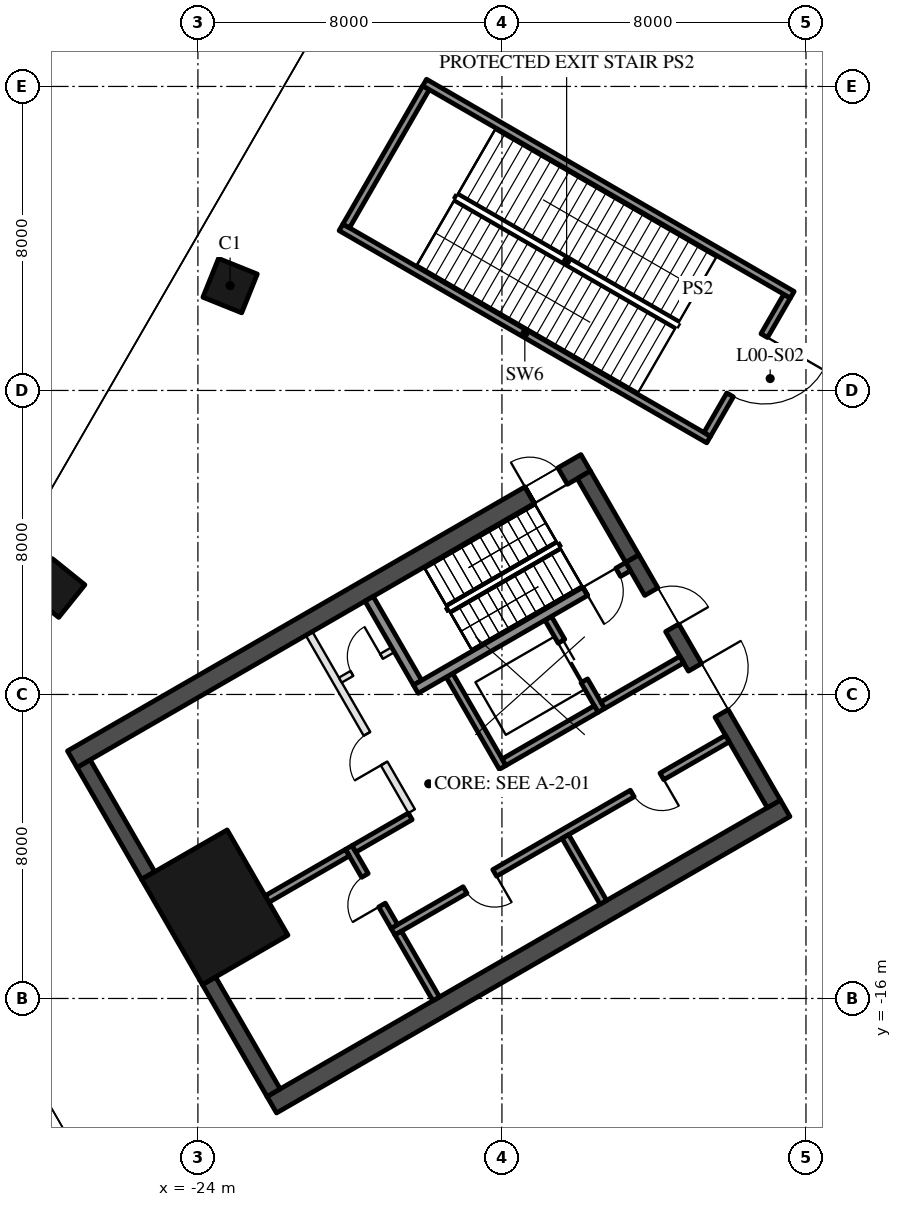
"""IFC4 building model, lengths in metres.
Left out: names, types, materials, properties, quantities, classifications, styles, units other than length and angle.
Written with IfcOpenShell. Run it as: python <this file> out.ifc"""

import sys

from ifc_helpers import new_model, si_unit, direction, frame, frame_2d, origin, origin_2d, place, context, subcontext, project, spatial, rectangle, hollow_rectangle, extrude, boolean, halfspace, element, fill, save


model = new_model("IFC4")
c1 = context("Model", 3, precision=1e-05, world=origin(), true_north=direction((0.0, 1.0)))
c2 = subcontext(c1, "Body", "Model", "MODEL_VIEW")
j1 = project(units=[si_unit("LENGTHUNIT", "METRE"), si_unit("PLANEANGLEUNIT", "RADIAN")], contexts=[c1])
p1 = place(None, origin())
s1 = spatial("IfcSite", under=j1, at=p1, CompositionType="ELEMENT")
p2 = place(p1, origin())
s2 = spatial("IfcBuilding", under=s1, at=p2, CompositionType="ELEMENT")
p3 = place(p2, origin())
s3 = spatial("IfcBuildingStorey", under=s2, at=p3, CompositionType="ELEMENT", Elevation=0.0)
p4 = place(p3, frame((-23.153, 2.758, 0.0), z_axis=(0.158231651294, -0.022440027718, 0.987146994973), x_axis=(-0.495168958636, -0.866745273107, 0.059668534009)))
e1 = element("IfcColumn", 1, at=p4, inside=s3, PredefinedType="COLUMN", context=c2, shape_type="SweptSolid", body=[
    boolean("DIFFERENCE", extrude(hollow_rectangle(XDim=1.1, YDim=1.1, WallThickness=0.05, at=origin_2d()), origin(), (0.0, 0.0, 1.0), 9.117), halfspace(frame((0.0, 0.0, 9.101), z_axis=(0.0, 0.0, 1.0), x_axis=(1.0, 0.0, 0.0)), False)),
])
p5 = place(p3, frame((-27.747, -5.199, 0.0), z_axis=(0.187040427199, 0.029060254354, 0.981922288274), x_axis=(-0.488808494451, -0.86427960463, 0.118688755878)))
e2 = element("IfcColumn", 2, at=p5, inside=s3, PredefinedType="COLUMN", context=c2, shape_type="SweptSolid", body=[
    boolean("DIFFERENCE", extrude(hollow_rectangle(XDim=1.1, YDim=1.1, WallThickness=0.05, at=origin_2d()), origin(), (0.0, 0.0, 1.0), 9.166), halfspace(frame((0.0, 0.0, 9.146), z_axis=(0.0, 0.0, 1.0), x_axis=(1.0, 0.0, 0.0)), False)),
])
p6 = place(p3, frame((-23.556, -13.6, 0.0), z_axis=(0.0, 0.0, 1.0), x_axis=(-0.5, 0.866025403784, 0.0)))
e3 = element("IfcColumn", 3, at=p6, inside=s3, PredefinedType="COLUMN", context=c2, shape_type="SweptSolid", body=[
    extrude(hollow_rectangle(XDim=3.2, YDim=2.6, WallThickness=0.08, at=origin_2d()), origin(), (0.0, 0.0, 1.0), 9.0),
])
p7 = place(p3, frame((-8.547, -10.997, 0.0), z_axis=(0.0, 0.0, 1.0), x_axis=(-0.866024264262, -0.500001973705, 0.0)))
e4 = element("IfcWall", 4, at=p7, inside=s3, PredefinedType="SHEAR", context=c2, shape_type="SweptSolid", body=[
    extrude(rectangle(XDim=15.6, YDim=0.5, at=frame_2d((7.8, 0.0))), origin(), (0.0, 0.0, 1.0), 8.7),
])
p8 = place(p3, frame((-23.708, -15.536, 0.0), z_axis=(0.0, 0.0, 1.0), x_axis=(0.500008388397, -0.866020560687, 0.0)))
e5 = element("IfcWall", 5, at=p8, inside=s3, PredefinedType="SHEAR", context=c2, shape_type="SweptSolid", body=[
    extrude(rectangle(XDim=3.4, YDim=0.4, at=frame_2d((1.7, 0.0))), origin(), (0.0, 0.0, 1.0), 8.7),
])
p9 = place(p3, frame((-27.009, -9.82, 0.0), z_axis=(0.0, 0.0, 1.0), x_axis=(0.499977295307, -0.866038511948, 0.0)))
e6 = element("IfcWall", 6, at=p9, inside=s3, PredefinedType="SHEAR", context=c2, shape_type="SweptSolid", body=[
    extrude(rectangle(XDim=3.4, YDim=0.4, at=frame_2d((1.7, 0.0))), origin(), (0.0, 0.0, 1.0), 8.7),
])
p10 = place(p3, frame((-19.496, -5.482, 0.0), z_axis=(0.0, 0.0, 1.0), x_axis=(0.499990435942, -0.866030925526, 0.0)))
e7 = element("IfcWall", 7, at=p10, inside=s3, PredefinedType="SHEAR", context=c2, shape_type="SweptSolid", body=[
    extrude(rectangle(XDim=2.55, YDim=0.25, at=frame_2d((1.275, 0.0))), origin(), (0.0, 0.0, 1.0), 8.7),
])
p11 = place(p3, frame((-17.381, -7.495, 0.0), z_axis=(0.0, 0.0, 1.0), x_axis=(0.500011755427, -0.866018616679, 0.0)))
e8 = element("IfcWall", 8, at=p11, inside=s3, PredefinedType="SHEAR", context=c2, shape_type="SweptSolid", body=[
    extrude(rectangle(XDim=2.8, YDim=0.2, at=frame_2d((1.4, 0.0))), origin(), (0.0, 0.0, 1.0), 8.7),
])
p12 = place(p3, frame((-14.783, -5.995, 0.0), z_axis=(0.0, 0.0, 1.0), x_axis=(0.49994636267, -0.866056369097, 0.0)))
e9 = element("IfcWall", 9, at=p12, inside=s3, PredefinedType="SHEAR", context=c2, shape_type="SweptSolid", body=[
    extrude(rectangle(XDim=2.8, YDim=0.2, at=frame_2d((1.4, 0.0))), origin(), (0.0, 0.0, 1.0), 8.7),
])
p13 = place(p12, frame((0.7, 0.0, 0.0)))
e10 = element("IfcOpeningElement", 10, at=p13, cuts=e9, PredefinedType="OPENING", context=c2, shape_type="SweptSolid", body=[
    extrude(rectangle(XDim=1.2, YDim=2.1, at=frame_2d((0.6, 1.05))), frame((0.0, 0.11, 0.0), z_axis=(0.0, -1.0, 0.0), x_axis=(1.0, 0.0, 0.0)), (0.0, 0.0, 1.0), 0.22),
])
p14 = place(p3, frame((-13.52, -8.383, 0.0), z_axis=(0.0, 0.0, 1.0), x_axis=(-0.866034573852, -0.49998411664, 0.0)))
e11 = element("IfcWall", 11, at=p14, inside=s3, PredefinedType="SHEAR", context=c2, shape_type="SweptSolid", body=[
    extrude(rectangle(XDim=2.8, YDim=0.2, at=frame_2d((1.4, 0.0))), origin(), (0.0, 0.0, 1.0), 8.7),
])
p15 = place(p3, frame((-11.268, -7.083, 0.0), z_axis=(0.0, 0.0, 1.0), x_axis=(-0.866050077142, -0.499957262057, 0.0)))
e12 = element("IfcWall", 12, at=p15, inside=s3, PredefinedType="SHEAR", context=c2, shape_type="SweptSolid", body=[
    extrude(rectangle(XDim=2.4, YDim=0.2, at=frame_2d((1.2, 0.0))), origin(), (0.0, 0.0, 1.0), 8.7),
])
p16 = place(p3, frame((-10.068, -9.162, 0.0), z_axis=(0.0, 0.0, 1.0), x_axis=(-0.866032725843, -0.499987317609, 0.0)))
e13 = element("IfcWall", 13, at=p16, inside=s3, PredefinedType="SHEAR", context=c2, shape_type="SweptSolid", body=[
    extrude(rectangle(XDim=10.16, YDim=0.2, at=frame_2d((5.08, 0.0))), origin(), (0.0, 0.0, 1.0), 8.7),
])
p17 = place(p16, frame((1.99, 0.0, 0.0)))
e14 = element("IfcOpeningElement", 14, at=p17, cuts=e13, PredefinedType="OPENING", context=c2, shape_type="SweptSolid", body=[
    extrude(rectangle(XDim=0.9, YDim=2.1, at=frame_2d((0.45, 1.05))), frame((0.0, 0.11, 0.0), z_axis=(0.0, -1.0, 0.0), x_axis=(1.0, 0.0, 0.0)), (0.0, 0.0, 1.0), 0.22),
])
p18 = place(p16, frame((7.07, 0.0, 0.0)))
e15 = element("IfcOpeningElement", 15, at=p18, cuts=e13, PredefinedType="OPENING", context=c2, shape_type="SweptSolid", body=[
    extrude(rectangle(XDim=0.9, YDim=2.1, at=frame_2d((0.45, 1.05))), frame((0.0, 0.11, 0.0), z_axis=(0.0, -1.0, 0.0), x_axis=(1.0, 0.0, 0.0)), (0.0, 0.0, 1.0), 0.22),
])
p19 = place(p3, frame((-20.031, -12.026, 0.0), z_axis=(0.0, 0.0, 1.0), x_axis=(0.500033551112, -0.866006032174, 0.0)))
e16 = element("IfcWall", 16, at=p19, inside=s3, PredefinedType="SHEAR", context=c2, shape_type="SweptSolid", body=[
    extrude(rectangle(XDim=2.4, YDim=0.2, at=frame_2d((1.2, 0.0))), origin(), (0.0, 0.0, 1.0), 8.7),
])
p20 = place(p19, frame((0.85, 0.0, 0.0)))
e17 = element("IfcOpeningElement", 17, at=p20, cuts=e16, PredefinedType="OPENING", context=c2, shape_type="SweptSolid", body=[
    extrude(rectangle(XDim=0.9, YDim=2.1, at=frame_2d((0.45, 1.05))), frame((0.0, 0.11, 0.0), z_axis=(0.0, -1.0, 0.0), x_axis=(1.0, 0.0, 0.0)), (0.0, 0.0, 1.0), 0.22),
])
p21 = place(p3, frame((-18.413, -11.208, 0.0), z_axis=(0.0, 0.0, 1.0), x_axis=(-0.866038183914, -0.499977863513, 0.0)))
e18 = element("IfcWall", 18, at=p21, inside=s3, PredefinedType="SHEAR", context=c2, shape_type="SweptSolid", body=[
    extrude(rectangle(XDim=1.71, YDim=0.2, at=frame_2d((0.855, 0.0))), origin(), (0.0, 0.0, 1.0), 8.7),
])
for number, where, z_axis, x_axis in (
    (19, (-14.331, -11.738, 0.0), (0.0, 0.0, 1.0), (0.5, -0.866, 0.0)),
    (20, (-18.73, -14.278, 0.0), (0.0, 0.0, 1.0), (0.5, -0.866, 0.0)),
):
    element("IfcWall", number, at=place(p3, frame(where, z_axis=z_axis, x_axis=x_axis)), inside=s3, PredefinedType="SHEAR", context=c2, shape_type="SweptSolid", body=[
        extrude(rectangle(XDim=2.0, YDim=0.2, at=frame_2d((1.0, 0.0))), origin(), (0.0, 0.0, 1.0), 8.7),
    ])
p22 = place(p3, frame((-20.067, -12.163, 0.0), z_axis=(0.0, 0.0, 1.0), x_axis=(-0.866048967903, -0.499959183527, 0.0)))
e21 = element("IfcWall", 21, at=p22, inside=s3, PredefinedType="SHEAR", context=c2, shape_type="SweptSolid", body=[
    extrude(rectangle(XDim=2.44, YDim=0.2, at=frame_2d((1.22, 0.0))), origin(), (0.0, 0.0, 1.0), 8.7),
])
p23 = place(p3, frame((-21.076, -6.395, 0.0), z_axis=(0.0, 0.0, 1.0), x_axis=(0.50001468107, -0.866016927499, 0.0)))
e22 = element("IfcWall", 22, at=p23, inside=s3, PredefinedType="PARTITIONING", context=c2, shape_type="SweptSolid", body=[
    extrude(rectangle(XDim=5.4, YDim=0.2, at=frame_2d((2.7, 0.0))), origin(), (0.0, 0.0, 1.0), 8.7),
])
p24 = place(p23, frame((3.05, 0.0, 0.0)))
e23 = element("IfcOpeningElement", 23, at=p24, cuts=e22, PredefinedType="OPENING", context=c2, shape_type="SweptSolid", body=[
    extrude(rectangle(XDim=0.9, YDim=2.1, at=frame_2d((0.45, 1.05))), frame((0.0, 0.11, 0.0), z_axis=(0.0, -1.0, 0.0), x_axis=(1.0, 0.0, 0.0)), (0.0, 0.0, 1.0), 0.22),
])
p25 = place(p3, frame((-18.866, -6.822, 0.0), z_axis=(0.0, 0.0, 1.0), x_axis=(-0.866028054938, -0.499995408039, 0.0)))
e24 = element("IfcWall", 24, at=p25, inside=s3, PredefinedType="PARTITIONING", context=c2, shape_type="SweptSolid", body=[
    extrude(rectangle(XDim=1.6, YDim=0.15, at=frame_2d((0.8, 0.0))), origin(), (0.0, 0.0, 1.0), 8.7),
])
p26 = place(p25, frame((0.35, 0.0, 0.0)))
e25 = element("IfcOpeningElement", 25, at=p26, cuts=e24, PredefinedType="OPENING", context=c2, shape_type="SweptSolid", body=[
    extrude(rectangle(XDim=0.9, YDim=2.1, at=frame_2d((0.45, 1.05))), frame((0.0, 0.085, 0.0), z_axis=(0.0, -1.0, 0.0), x_axis=(1.0, 0.0, 0.0)), (0.0, 0.0, 1.0), 0.17),
])
p27 = place(p3, frame((-13.797, -1.903, 0.0), z_axis=(0.0, 0.0, 1.0), x_axis=(-0.866033076574, -0.499986710104, 0.0)))
e26 = element("IfcWall", 26, at=p27, inside=s3, PredefinedType="SHEAR", context=c2, shape_type="SweptSolid", body=[
    extrude(rectangle(XDim=1.706, YDim=0.5, at=frame_2d((0.853, 0.0))), origin(), (0.0, 0.0, 1.0), 8.7),
])
p28 = place(p27, frame((0.7, 0.0, 0.0)))
e27 = element("IfcOpeningElement", 27, at=p28, cuts=e26, PredefinedType="OPENING", context=c2, shape_type="SweptSolid", body=[
    extrude(rectangle(XDim=1.0, YDim=2.1, at=frame_2d((0.5, 1.05))), frame((0.0, 0.26, 0.0), z_axis=(0.0, -1.0, 0.0), x_axis=(1.0, 0.0, 0.0)), (0.0, 0.0, 1.0), 0.52),
])
p29 = place(p3, frame((-15.274, -2.756, 0.0), z_axis=(0.0, 0.0, 1.0), x_axis=(-0.86602318214, -0.500003847982, 0.0)))
e28 = element("IfcWall", 28, at=p29, inside=s3, PredefinedType="SHEAR", context=c2, shape_type="SweptSolid", body=[
    extrude(rectangle(XDim=13.894, YDim=0.5, at=frame_2d((6.947, 0.0))), origin(), (0.0, 0.0, 1.0), 8.7),
])
p30 = place(p3, frame((-13.845, -2.22, 0.0), z_axis=(0.0, 0.0, 1.0), x_axis=(0.500062241894, -0.865989465428, 0.0)))
e29 = element("IfcWall", 29, at=p30, inside=s3, PredefinedType="SHEAR", context=c2, shape_type="SweptSolid", body=[
    extrude(rectangle(XDim=2.55, YDim=0.4, at=frame_2d((1.275, 0.0))), origin(), (0.0, 0.0, 1.0), 8.7),
])
p31 = place(p3, frame((-12.57, -4.428, 0.0), z_axis=(0.0, 0.0, 1.0), x_axis=(0.499984378957, -0.86603442241, 0.0)))
e30 = element("IfcWall", 30, at=p31, inside=s3, PredefinedType="SHEAR", context=c2, shape_type="SweptSolid", body=[
    extrude(rectangle(XDim=7.45, YDim=0.4, at=frame_2d((3.725, 0.0))), origin(), (0.0, 0.0, 1.0), 8.7),
])
p32 = place(p31, frame((1.0, 0.0, 0.0)))
e31 = element("IfcOpeningElement", 31, at=p32, cuts=e30, PredefinedType="OPENING", context=c2, shape_type="SweptSolid", body=[
    extrude(rectangle(XDim=1.1, YDim=2.1, at=frame_2d((0.55, 1.05))), frame((0.0, 0.21, 0.0), z_axis=(0.0, -1.0, 0.0), x_axis=(1.0, 0.0, 0.0)), (0.0, 0.0, 1.0), 0.42),
])
p33 = place(p31, frame((3.3, 0.0, 0.0)))
e32 = element("IfcOpeningElement", 32, at=p33, cuts=e30, PredefinedType="OPENING", context=c2, shape_type="SweptSolid", body=[
    extrude(rectangle(XDim=1.4, YDim=2.1, at=frame_2d((0.7, 1.05))), frame((0.0, 0.21, 0.0), z_axis=(0.0, -1.0, 0.0), x_axis=(1.0, 0.0, 0.0)), (0.0, 0.0, 1.0), 0.42),
])
p34 = place(p3, frame((-12.681, -4.636, 0.0), z_axis=(0.0, 0.0, 1.0), x_axis=(-0.86601437931, -0.500019094464, 0.0)))
e33 = element("IfcWall", 33, at=p34, inside=s3, PredefinedType="SHEAR", context=c2, shape_type="SweptSolid", body=[
    extrude(rectangle(XDim=1.306, YDim=0.25, at=frame_2d((0.653, 0.0))), origin(), (0.0, 0.0, 1.0), 8.7),
])
p35 = place(p34, frame((0.3, 0.0, 0.0)))
e34 = element("IfcOpeningElement", 34, at=p35, cuts=e33, PredefinedType="OPENING", context=c2, shape_type="SweptSolid", body=[
    extrude(rectangle(XDim=1.0, YDim=2.1, at=frame_2d((0.5, 1.05))), frame((0.0, 0.135, 0.0), z_axis=(0.0, -1.0, 0.0), x_axis=(1.0, 0.0, 0.0)), (0.0, 0.0, 1.0), 0.27),
])
p36 = place(p3, frame((-13.812, -5.29, 0.0), z_axis=(0.0, 0.0, 1.0), x_axis=(-0.866023561601, -0.500003190742, 0.0)))
e35 = element("IfcWall", 35, at=p36, inside=s3, PredefinedType="SHEAR", context=c2, shape_type="SweptSolid", body=[
    extrude(rectangle(XDim=5.144, YDim=0.25, at=frame_2d((2.572, 0.0))), origin(), (0.0, 0.0, 1.0), 8.7),
])
p37 = place(p3, frame((-10.561, -1.292, 0.0), z_axis=(0.0, 0.0, 1.0), x_axis=(-0.866023249352, 0.500003731568, 0.0)))
e36 = element("IfcWall", 36, at=p37, inside=s3, PredefinedType="SOLIDWALL", context=c2, shape_type="SweptSolid", body=[
    extrude(rectangle(XDim=11.17, YDim=0.2, at=frame_2d((5.585, 0.0))), origin(), (0.0, 0.0, 1.0), 8.7),
])
p38 = place(p3, frame((-17.998, 7.966, 0.0), z_axis=(0.0, 0.0, 1.0), x_axis=(-0.500027713859, -0.866009402589, 0.0)))
e37 = element("IfcWall", 37, at=p38, inside=s3, PredefinedType="SOLIDWALL", context=c2, shape_type="SweptSolid", body=[
    extrude(rectangle(XDim=4.2, YDim=0.2, at=frame_2d((2.1, 0.0))), origin(), (0.0, 0.0, 1.0), 8.7),
])
p39 = place(p3, frame((-8.498, 2.481, 0.0), z_axis=(0.0, 0.0, 1.0), x_axis=(-0.500027713859, -0.866009402589, 0.0)))
e38 = element("IfcWall", 38, at=p39, inside=s3, PredefinedType="SOLIDWALL", context=c2, shape_type="SweptSolid", body=[
    extrude(rectangle(XDim=4.2, YDim=0.2, at=frame_2d((2.1, 0.0))), origin(), (0.0, 0.0, 1.0), 8.7),
])
p40 = place(p39, frame((1.2, 0.0, 0.0)))
e39 = element("IfcOpeningElement", 39, at=p40, cuts=e38, PredefinedType="OPENING", context=c2, shape_type="SweptSolid", body=[
    extrude(rectangle(XDim=1.8, YDim=2.1, at=frame_2d((0.9, 1.05))), frame((0.0, 0.11, 0.0), z_axis=(0.0, -1.0, 0.0), x_axis=(1.0, 0.0, 0.0)), (0.0, 0.0, 1.0), 0.22),
])
p41 = place(p3, frame((-8.361, 2.518, 0.0), z_axis=(0.0, 0.0, 1.0), x_axis=(-0.866028713561, 0.499994267255, 0.0)))
e40 = element("IfcWall", 40, at=p41, inside=s3, PredefinedType="SOLIDWALL", context=c2, shape_type="SweptSolid", body=[
    extrude(rectangle(XDim=11.17, YDim=0.2, at=frame_2d((5.585, 0.0))), origin(), (0.0, 0.0, 1.0), 8.7),
])
p42 = place(p13, origin())
e41 = element("IfcDoor", 41, at=p42, inside=s3, OperationType="DOUBLE_DOOR_SLIDING", PredefinedType="DOOR", context=c2, shape_type="SweptSolid", body=[
    extrude(rectangle(XDim=1.2, YDim=2.1, at=frame_2d((0.6, 1.05))), frame((0.0, 0.025, 0.0), z_axis=(0.0, -1.0, 0.0), x_axis=(1.0, 0.0, 0.0)), (0.0, 0.0, 1.0), 0.05),
])
fill(e10, e41)
p43 = place(p26, frame((0.9, 0.0, 0.0), z_axis=(0.0, 0.0, 1.0), x_axis=(-1.0, 0.0, 0.0)))
e42 = element("IfcDoor", 42, at=p43, inside=s3, OperationType="SINGLE_SWING_RIGHT", PredefinedType="DOOR", context=c2, shape_type="SweptSolid", body=[
    extrude(rectangle(XDim=0.9, YDim=2.1, at=frame_2d((0.45, 1.05))), frame((0.0, 0.025, 0.0), z_axis=(0.0, -1.0, 0.0), x_axis=(1.0, 0.0, 0.0)), (0.0, 0.0, 1.0), 0.05),
])
fill(e25, e42)
p44 = place(p17, origin())
e43 = element("IfcDoor", 43, at=p44, inside=s3, OperationType="SINGLE_SWING_LEFT", PredefinedType="DOOR", context=c2, shape_type="SweptSolid", body=[
    extrude(rectangle(XDim=0.9, YDim=2.1, at=frame_2d((0.45, 1.05))), frame((0.0, 0.025, 0.0), z_axis=(0.0, -1.0, 0.0), x_axis=(1.0, 0.0, 0.0)), (0.0, 0.0, 1.0), 0.05),
])
fill(e14, e43)
p45 = place(p18, origin())
e44 = element("IfcDoor", 44, at=p45, inside=s3, OperationType="SINGLE_SWING_LEFT", PredefinedType="DOOR", context=c2, shape_type="SweptSolid", body=[
    extrude(rectangle(XDim=0.9, YDim=2.1, at=frame_2d((0.45, 1.05))), frame((0.0, 0.025, 0.0), z_axis=(0.0, -1.0, 0.0), x_axis=(1.0, 0.0, 0.0)), (0.0, 0.0, 1.0), 0.05),
])
fill(e15, e44)
p46 = place(p20, frame((0.9, 0.0, 0.0), z_axis=(0.0, 0.0, 1.0), x_axis=(-1.0, 0.0, 0.0)))
e45 = element("IfcDoor", 45, at=p46, inside=s3, OperationType="SINGLE_SWING_LEFT", PredefinedType="DOOR", context=c2, shape_type="SweptSolid", body=[
    extrude(rectangle(XDim=0.9, YDim=2.1, at=frame_2d((0.45, 1.05))), frame((0.0, 0.025, 0.0), z_axis=(0.0, -1.0, 0.0), x_axis=(1.0, 0.0, 0.0)), (0.0, 0.0, 1.0), 0.05),
])
fill(e17, e45)
p47 = place(p24, frame((0.9, 0.0, 0.0), z_axis=(0.0, 0.0, 1.0), x_axis=(-1.0, 0.0, 0.0)))
e46 = element("IfcDoor", 46, at=p47, inside=s3, OperationType="SINGLE_SWING_LEFT", PredefinedType="DOOR", context=c2, shape_type="SweptSolid", body=[
    extrude(rectangle(XDim=0.9, YDim=2.1, at=frame_2d((0.45, 1.05))), frame((0.0, 0.025, 0.0), z_axis=(0.0, -1.0, 0.0), x_axis=(1.0, 0.0, 0.0)), (0.0, 0.0, 1.0), 0.05),
])
fill(e23, e46)
p48 = place(p32, origin())
e47 = element("IfcDoor", 47, at=p48, inside=s3, OperationType="SINGLE_SWING_RIGHT", PredefinedType="DOOR", context=c2, shape_type="SweptSolid", body=[
    extrude(rectangle(XDim=1.1, YDim=2.1, at=frame_2d((0.55, 1.05))), frame((0.0, 0.025, 0.0), z_axis=(0.0, -1.0, 0.0), x_axis=(1.0, 0.0, 0.0)), (0.0, 0.0, 1.0), 0.05),
])
fill(e31, e47)
p49 = place(p33, origin())
e48 = element("IfcDoor", 48, at=p49, inside=s3, OperationType="DOUBLE_DOOR_SINGLE_SWING", PredefinedType="DOOR", context=c2, shape_type="SweptSolid", body=[
    extrude(rectangle(XDim=1.4, YDim=2.1, at=frame_2d((0.7, 1.05))), frame((0.0, 0.025, 0.0), z_axis=(0.0, -1.0, 0.0), x_axis=(1.0, 0.0, 0.0)), (0.0, 0.0, 1.0), 0.05),
])
fill(e32, e48)
p50 = place(p35, origin())
e49 = element("IfcDoor", 49, at=p50, inside=s3, OperationType="SINGLE_SWING_RIGHT", PredefinedType="DOOR", context=c2, shape_type="SweptSolid", body=[
    extrude(rectangle(XDim=1.0, YDim=2.1, at=frame_2d((0.5, 1.05))), frame((0.0, 0.025, 0.0), z_axis=(0.0, -1.0, 0.0), x_axis=(1.0, 0.0, 0.0)), (0.0, 0.0, 1.0), 0.05),
])
fill(e34, e49)
p51 = place(p28, frame((1.0, 0.0, 0.0), z_axis=(0.0, 0.0, 1.0), x_axis=(-1.0, 0.0, 0.0)))
e50 = element("IfcDoor", 50, at=p51, inside=s3, OperationType="SINGLE_SWING_LEFT", PredefinedType="DOOR", context=c2, shape_type="SweptSolid", body=[
    extrude(rectangle(XDim=1.0, YDim=2.1, at=frame_2d((0.5, 1.05))), frame((0.0, 0.025, 0.0), z_axis=(0.0, -1.0, 0.0), x_axis=(1.0, 0.0, 0.0)), (0.0, 0.0, 1.0), 0.05),
])
fill(e27, e50)
p52 = place(p40, origin())
e51 = element("IfcDoor", 51, at=p52, inside=s3, OperationType="DOUBLE_DOOR_SINGLE_SWING", PredefinedType="DOOR", context=c2, shape_type="SweptSolid", body=[
    extrude(rectangle(XDim=1.8, YDim=2.1, at=frame_2d((0.9, 1.05))), frame((0.0, 0.025, 0.0), z_axis=(0.0, -1.0, 0.0), x_axis=(1.0, 0.0, 0.0)), (0.0, 0.0, 1.0), 0.05),
])
fill(e39, e51)
save(model, sys.argv[1])
